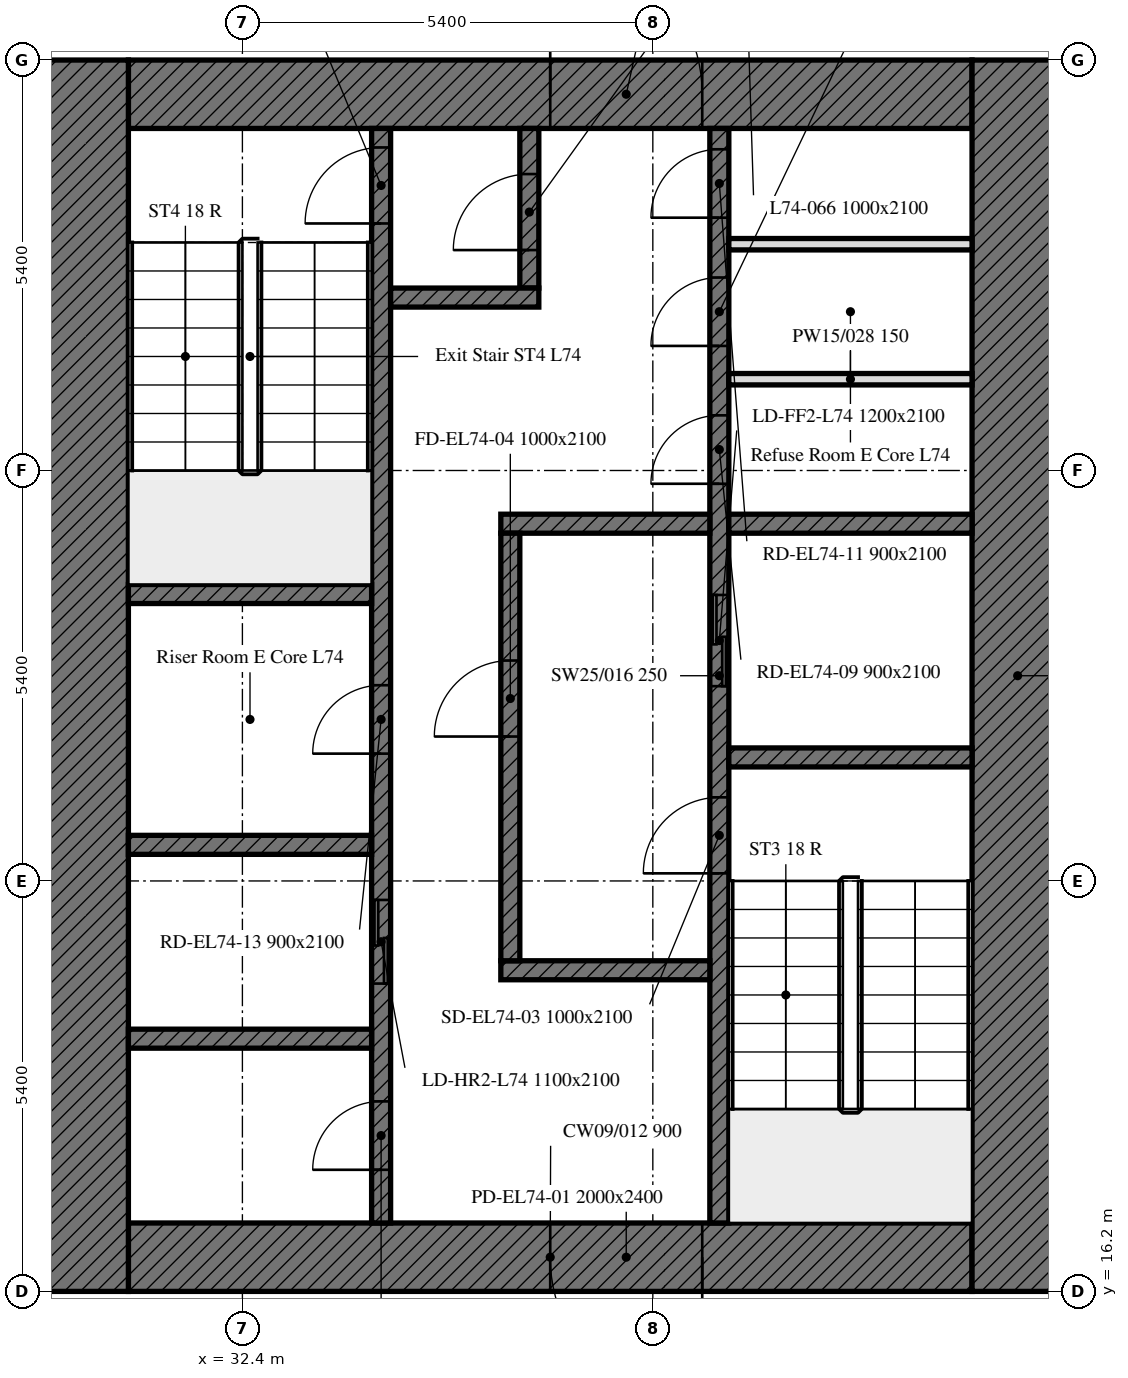
"""IFC4 building model, lengths in metres.
Left out: names, types, materials, properties, quantities, classifications, styles, units other than length and angle.
Written with IfcOpenShell. Run it as: python <this file> out.ifc"""

import sys

from ifc_helpers import new_model, si_unit, direction, frame, frame_2d, origin, place, context, subcontext, project, spatial, rectangle, extrude, element, fill, save


model = new_model("IFC4")
c1 = context("Model", 3, precision=1e-05, world=origin(), true_north=direction((0.0, 1.0)))
c2 = subcontext(c1, "Body", "Model", "MODEL_VIEW")
j1 = project(units=[si_unit("LENGTHUNIT", "METRE"), si_unit("PLANEANGLEUNIT", "RADIAN")], contexts=[c1])
p1 = place(None, origin())
s1 = spatial("IfcSite", under=j1, at=p1, CompositionType="ELEMENT")
p2 = place(p1, origin())
s2 = spatial("IfcBuilding", under=s1, at=p2, CompositionType="ELEMENT")
p3 = place(p2, frame((0.0, 0.0, 298.3)))
s3 = spatial("IfcBuildingStorey", under=s2, at=p3, CompositionType="ELEMENT", Elevation=298.3)
p4 = place(p3, frame((42.0, 16.65, 0.0), z_axis=(0.0, 0.0, 1.0), x_axis=(-1.0, 0.0, 0.0)))
e1 = element("IfcWall", 1, at=p4, inside=s3, PredefinedType="SOLIDWALL", context=c2, shape_type="SweptSolid", body=[
    extrude(rectangle(XDim=11.1, YDim=0.9, at=frame_2d((5.55, 0.0))), origin(), (0.0, 0.0, 1.0), 3.0),
])
p5 = place(p4, frame((3.55, 0.0, 0.0)))
e2 = element("IfcOpeningElement", 2, at=p5, cuts=e1, PredefinedType="OPENING", context=c2, shape_type="SweptSolid", body=[
    extrude(rectangle(XDim=2.0, YDim=2.4, at=frame_2d((1.0, 1.2))), frame((0.0, 0.45, 0.0), z_axis=(0.0, -1.0, 0.0), x_axis=(1.0, 0.0, 0.0)), (0.0, 0.0, 1.0), 0.9),
])
p6 = place(p3, frame((30.9, 31.95, 0.0), z_axis=(0.0, 0.0, 1.0), x_axis=(1.0, 0.0, 0.0)))
e3 = element("IfcWall", 3, at=p6, inside=s3, PredefinedType="SOLIDWALL", context=c2, shape_type="SweptSolid", body=[
    extrude(rectangle(XDim=11.1, YDim=0.9, at=frame_2d((5.55, 0.0))), origin(), (0.0, 0.0, 1.0), 3.0),
])
p7 = place(p6, frame((5.55, 0.0, 0.0)))
e4 = element("IfcOpeningElement", 4, at=p7, cuts=e3, PredefinedType="OPENING", context=c2, shape_type="SweptSolid", body=[
    extrude(rectangle(XDim=2.0, YDim=2.4, at=frame_2d((1.0, 1.2))), frame((0.0, 0.45, 0.0), z_axis=(0.0, -1.0, 0.0), x_axis=(1.0, 0.0, 0.0)), (0.0, 0.0, 1.0), 0.9),
])
for number, where, z_axis, x_axis in (
    (5, (42.6, 32.4, 0.0), (0.0, 0.0, 1.0), (0.0, -1.0, 0.0)),
    (6, (30.3, 16.2, 0.0), (0.0, 0.0, 1.0), (0.0, 1.0, 0.0)),
):
    element("IfcWall", number, at=place(p3, frame(where, z_axis=z_axis, x_axis=x_axis)), inside=s3, PredefinedType="SOLIDWALL", context=c2, shape_type="SweptSolid", body=[
        extrude(rectangle(XDim=16.2, YDim=1.2, at=frame_2d((8.1, 0.0))), origin(), (0.0, 0.0, 1.0), 3.0),
    ])
p8 = place(p3, frame((38.675, 17.1, 0.0), z_axis=(0.0, 0.0, 1.0), x_axis=(0.0, 1.0, 0.0)))
e7 = element("IfcWall", 7, at=p8, inside=s3, PredefinedType="SOLIDWALL", context=c2, shape_type="SweptSolid", body=[
    extrude(rectangle(XDim=14.4, YDim=0.25, at=frame_2d((7.2, 0.0))), origin(), (0.0, 0.0, 1.0), 3.0),
])
p9 = place(p8, frame((4.6, 0.0, 0.0)))
e8 = element("IfcOpeningElement", 8, at=p9, cuts=e7, PredefinedType="OPENING", context=c2, shape_type="SweptSolid", body=[
    extrude(rectangle(XDim=1.0, YDim=2.1, at=frame_2d((0.5, 1.05))), frame((0.0, 0.125, 0.0), z_axis=(0.0, -1.0, 0.0), x_axis=(1.0, 0.0, 0.0)), (0.0, 0.0, 1.0), 0.25),
])
p10 = place(p8, frame((7.062, 0.0, 0.0)))
e9 = element("IfcOpeningElement", 9, at=p10, cuts=e7, PredefinedType="OPENING", context=c2, shape_type="SweptSolid", body=[
    extrude(rectangle(XDim=1.2, YDim=2.1, at=frame_2d((0.6, 1.05))), frame((0.0, 0.125, 0.0), z_axis=(0.0, -1.0, 0.0), x_axis=(1.0, 0.0, 0.0)), (0.0, 0.0, 1.0), 0.25),
])
p11 = place(p8, frame((9.726, 0.0, 0.0)))
e10 = element("IfcOpeningElement", 10, at=p11, cuts=e7, PredefinedType="OPENING", context=c2, shape_type="SweptSolid", body=[
    extrude(rectangle(XDim=0.9, YDim=2.1, at=frame_2d((0.45, 1.05))), frame((0.0, 0.125, 0.0), z_axis=(0.0, -1.0, 0.0), x_axis=(1.0, 0.0, 0.0)), (0.0, 0.0, 1.0), 0.25),
])
p12 = place(p8, frame((11.539, 0.0, 0.0)))
e11 = element("IfcOpeningElement", 11, at=p12, cuts=e7, PredefinedType="OPENING", context=c2, shape_type="SweptSolid", body=[
    extrude(rectangle(XDim=0.9, YDim=2.1, at=frame_2d((0.45, 1.05))), frame((0.0, 0.125, 0.0), z_axis=(0.0, -1.0, 0.0), x_axis=(1.0, 0.0, 0.0)), (0.0, 0.0, 1.0), 0.25),
])
p13 = place(p8, frame((13.226, 0.0, 0.0)))
e12 = element("IfcOpeningElement", 12, at=p13, cuts=e7, PredefinedType="OPENING", context=c2, shape_type="SweptSolid", body=[
    extrude(rectangle(XDim=0.9, YDim=2.1, at=frame_2d((0.45, 1.05))), frame((0.0, 0.125, 0.0), z_axis=(0.0, -1.0, 0.0), x_axis=(1.0, 0.0, 0.0)), (0.0, 0.0, 1.0), 0.25),
])
p14 = place(p3, frame((34.225, 17.1, 0.0), z_axis=(0.0, 0.0, 1.0), x_axis=(0.0, 1.0, 0.0)))
e13 = element("IfcWall", 13, at=p14, inside=s3, PredefinedType="SOLIDWALL", context=c2, shape_type="SweptSolid", body=[
    extrude(rectangle(XDim=14.4, YDim=0.25, at=frame_2d((7.2, 0.0))), origin(), (0.0, 0.0, 1.0), 3.0),
])
p15 = place(p14, frame((13.15, 0.0, 0.0)))
e14 = element("IfcOpeningElement", 14, at=p15, cuts=e13, PredefinedType="OPENING", context=c2, shape_type="SweptSolid", body=[
    extrude(rectangle(XDim=1.0, YDim=2.1, at=frame_2d((0.5, 1.05))), frame((0.0, 0.125, 0.0), z_axis=(0.0, -1.0, 0.0), x_axis=(1.0, 0.0, 0.0)), (0.0, 0.0, 1.0), 0.25),
])
p16 = place(p14, frame((3.15, 0.0, 0.0)))
e15 = element("IfcOpeningElement", 15, at=p16, cuts=e13, PredefinedType="OPENING", context=c2, shape_type="SweptSolid", body=[
    extrude(rectangle(XDim=1.1, YDim=2.1, at=frame_2d((0.55, 1.05))), frame((0.0, 0.125, 0.0), z_axis=(0.0, -1.0, 0.0), x_axis=(1.0, 0.0, 0.0)), (0.0, 0.0, 1.0), 0.25),
])
p17 = place(p14, frame((0.7, 0.0, 0.0)))
e16 = element("IfcOpeningElement", 16, at=p17, cuts=e13, PredefinedType="OPENING", context=c2, shape_type="SweptSolid", body=[
    extrude(rectangle(XDim=0.9, YDim=2.1, at=frame_2d((0.45, 1.05))), frame((0.0, 0.125, 0.0), z_axis=(0.0, -1.0, 0.0), x_axis=(1.0, 0.0, 0.0)), (0.0, 0.0, 1.0), 0.25),
])
p18 = place(p14, frame((6.175, 0.0, 0.0)))
e17 = element("IfcOpeningElement", 17, at=p18, cuts=e13, PredefinedType="OPENING", context=c2, shape_type="SweptSolid", body=[
    extrude(rectangle(XDim=0.9, YDim=2.1, at=frame_2d((0.45, 1.05))), frame((0.0, 0.125, 0.0), z_axis=(0.0, -1.0, 0.0), x_axis=(1.0, 0.0, 0.0)), (0.0, 0.0, 1.0), 0.25),
])
p19 = place(p3, frame((38.8, 23.225, 0.0), z_axis=(0.0, 0.0, 1.0), x_axis=(1.0, 0.0, 0.0)))
e18 = element("IfcWall", 18, at=p19, inside=s3, PredefinedType="SOLIDWALL", context=c2, shape_type="SweptSolid", body=[
    extrude(rectangle(XDim=3.2, YDim=0.25, at=frame_2d((1.6, 0.0))), origin(), (0.0, 0.0, 1.0), 3.0),
])
for number, where, z_axis, x_axis in (
    (19, (30.9, 25.375, 0.0), (0.0, 0.0, 1.0), (1.0, 0.0, 0.0)),
    (20, (30.9, 22.075, 0.0), (0.0, 0.0, 1.0), (1.0, 0.0, 0.0)),
):
    element("IfcWall", number, at=place(p3, frame(where, z_axis=z_axis, x_axis=x_axis)), inside=s3, PredefinedType="SOLIDWALL", context=c2, shape_type="SweptSolid", body=[
        extrude(rectangle(XDim=3.2, YDim=0.25, at=frame_2d((1.6, 0.0))), origin(), (0.0, 0.0, 1.0), 3.0),
    ])
p20 = place(p3, frame((38.8, 26.3, 0.0), z_axis=(0.0, 0.0, 1.0), x_axis=(1.0, 0.0, 0.0)))
e21 = element("IfcWall", 21, at=p20, inside=s3, PredefinedType="SOLIDWALL", context=c2, shape_type="SweptSolid", body=[
    extrude(rectangle(XDim=3.2, YDim=0.25, at=frame_2d((1.6, 0.0))), origin(), (0.0, 0.0, 1.0), 3.0),
])
for number, where, z_axis, x_axis in (
    (22, (35.8, 26.3, 0.0), (0.0, 0.0, 1.0), (1.0, 0.0, 0.0)),
    (23, (35.8, 20.425, 0.0), (0.0, 0.0, 1.0), (1.0, 0.0, 0.0)),
):
    element("IfcWall", number, at=place(p3, frame(where, z_axis=z_axis, x_axis=x_axis)), inside=s3, PredefinedType="SOLIDWALL", context=c2, shape_type="SweptSolid", body=[
        extrude(rectangle(XDim=2.75, YDim=0.25, at=frame_2d((1.375, 0.0))), origin(), (0.0, 0.0, 1.0), 3.0),
    ])
p21 = place(p3, frame((36.175, 29.4, 0.0), z_axis=(0.0, 0.0, 1.0), x_axis=(0.0, 1.0, 0.0)))
e24 = element("IfcWall", 24, at=p21, inside=s3, PredefinedType="SOLIDWALL", context=c2, shape_type="SweptSolid", body=[
    extrude(rectangle(XDim=2.1, YDim=0.25, at=frame_2d((1.05, 0.0))), origin(), (0.0, 0.0, 1.0), 3.0),
])
p22 = place(p21, frame((0.5, 0.0, 0.0)))
e25 = element("IfcOpeningElement", 25, at=p22, cuts=e24, PredefinedType="OPENING", context=c2, shape_type="SweptSolid", body=[
    extrude(rectangle(XDim=1.0, YDim=2.1, at=frame_2d((0.5, 1.05))), frame((0.0, 0.125, 0.0), z_axis=(0.0, -1.0, 0.0), x_axis=(1.0, 0.0, 0.0)), (0.0, 0.0, 1.0), 0.25),
])
p23 = place(p3, frame((34.35, 29.275, 0.0), z_axis=(0.0, 0.0, 1.0), x_axis=(1.0, 0.0, 0.0)))
e26 = element("IfcWall", 26, at=p23, inside=s3, PredefinedType="SOLIDWALL", context=c2, shape_type="SweptSolid", body=[
    extrude(rectangle(XDim=1.95, YDim=0.25, at=frame_2d((0.975, 0.0))), origin(), (0.0, 0.0, 1.0), 3.0),
])
p24 = place(p3, frame((35.925, 20.55, 0.0), z_axis=(0.0, 0.0, 1.0), x_axis=(0.0, 1.0, 0.0)))
e27 = element("IfcWall", 27, at=p24, inside=s3, PredefinedType="SOLIDWALL", context=c2, shape_type="SweptSolid", body=[
    extrude(rectangle(XDim=5.625, YDim=0.25, at=frame_2d((2.812, 0.0))), origin(), (0.0, 0.0, 1.0), 3.0),
])
p25 = place(p24, frame((2.95, 0.0, 0.0)))
e28 = element("IfcOpeningElement", 28, at=p25, cuts=e27, PredefinedType="OPENING", context=c2, shape_type="SweptSolid", body=[
    extrude(rectangle(XDim=1.0, YDim=2.1, at=frame_2d((0.5, 1.05))), frame((0.0, 0.125, 0.0), z_axis=(0.0, -1.0, 0.0), x_axis=(1.0, 0.0, 0.0)), (0.0, 0.0, 1.0), 0.25),
])
p26 = place(p3, frame((30.9, 19.525, 0.0), z_axis=(0.0, 0.0, 1.0), x_axis=(1.0, 0.0, 0.0)))
e29 = element("IfcWall", 29, at=p26, inside=s3, PredefinedType="SOLIDWALL", context=c2, shape_type="SweptSolid", body=[
    extrude(rectangle(XDim=3.2, YDim=0.25, at=frame_2d((1.6, 0.0))), origin(), (0.0, 0.0, 1.0), 3.0),
])
for number, where, z_axis, x_axis in (
    (30, (38.8, 28.201, 0.0), (0.0, 0.0, 1.0), (1.0, 0.0, 0.0)),
    (31, (38.8, 29.977, 0.0), (0.0, 0.0, 1.0), (1.0, 0.0, 0.0)),
):
    element("IfcWall", number, at=place(p3, frame(where, z_axis=z_axis, x_axis=x_axis)), inside=s3, PredefinedType="PARTITIONING", context=c2, shape_type="SweptSolid", body=[
        extrude(rectangle(XDim=3.2, YDim=0.15, at=frame_2d((1.6, 0.0))), origin(), (0.0, 0.0, 1.0), 3.0),
    ])
p27 = place(p5, origin())
e32 = element("IfcDoor", 32, at=p27, inside=s3, OperationType="DOUBLE_DOOR_SINGLE_SWING", PredefinedType="DOOR", context=c2, shape_type="SweptSolid", body=[
    extrude(rectangle(XDim=2.0, YDim=2.4, at=frame_2d((1.0, 1.2))), frame((0.0, 0.025, 0.0), z_axis=(0.0, -1.0, 0.0), x_axis=(1.0, 0.0, 0.0)), (0.0, 0.0, 1.0), 0.05),
])
fill(e2, e32)
p28 = place(p7, origin())
e33 = element("IfcDoor", 33, at=p28, inside=s3, OperationType="DOUBLE_DOOR_SINGLE_SWING", PredefinedType="DOOR", context=c2, shape_type="SweptSolid", body=[
    extrude(rectangle(XDim=2.0, YDim=2.4, at=frame_2d((1.0, 1.2))), frame((0.0, 0.025, 0.0), z_axis=(0.0, -1.0, 0.0), x_axis=(1.0, 0.0, 0.0)), (0.0, 0.0, 1.0), 0.05),
])
fill(e4, e33)
p29 = place(p9, origin())
e34 = element("IfcDoor", 34, at=p29, inside=s3, OperationType="SINGLE_SWING_LEFT", PredefinedType="DOOR", context=c2, shape_type="SweptSolid", body=[
    extrude(rectangle(XDim=1.0, YDim=2.1, at=frame_2d((0.5, 1.05))), frame((0.0, 0.025, 0.0), z_axis=(0.0, -1.0, 0.0), x_axis=(1.0, 0.0, 0.0)), (0.0, 0.0, 1.0), 0.05),
])
fill(e8, e34)
p30 = place(p25, origin())
e35 = element("IfcDoor", 35, at=p30, inside=s3, OperationType="SINGLE_SWING_LEFT", PredefinedType="DOOR", context=c2, shape_type="SweptSolid", body=[
    extrude(rectangle(XDim=1.0, YDim=2.1, at=frame_2d((0.5, 1.05))), frame((0.0, 0.025, 0.0), z_axis=(0.0, -1.0, 0.0), x_axis=(1.0, 0.0, 0.0)), (0.0, 0.0, 1.0), 0.05),
])
fill(e28, e35)
p31 = place(p15, origin())
e36 = element("IfcDoor", 36, at=p31, inside=s3, OperationType="SINGLE_SWING_LEFT", PredefinedType="DOOR", context=c2, shape_type="SweptSolid", body=[
    extrude(rectangle(XDim=1.0, YDim=2.1, at=frame_2d((0.5, 1.05))), frame((0.0, 0.025, 0.0), z_axis=(0.0, -1.0, 0.0), x_axis=(1.0, 0.0, 0.0)), (0.0, 0.0, 1.0), 0.05),
])
fill(e14, e36)
p32 = place(p22, origin())
e37 = element("IfcDoor", 37, at=p32, inside=s3, OperationType="SINGLE_SWING_LEFT", PredefinedType="DOOR", context=c2, shape_type="SweptSolid", body=[
    extrude(rectangle(XDim=1.0, YDim=2.1, at=frame_2d((0.5, 1.05))), frame((0.0, 0.025, 0.0), z_axis=(0.0, -1.0, 0.0), x_axis=(1.0, 0.0, 0.0)), (0.0, 0.0, 1.0), 0.05),
])
fill(e25, e37)
p33 = place(p10, origin())
e38 = element("IfcDoor", 38, at=p33, inside=s3, OperationType="DOUBLE_DOOR_SLIDING", PredefinedType="DOOR", context=c2, shape_type="SweptSolid", body=[
    extrude(rectangle(XDim=1.2, YDim=2.1, at=frame_2d((0.6, 1.05))), frame((0.0, 0.025, 0.0), z_axis=(0.0, -1.0, 0.0), x_axis=(1.0, 0.0, 0.0)), (0.0, 0.0, 1.0), 0.05),
])
fill(e9, e38)
p34 = place(p16, origin())
e39 = element("IfcDoor", 39, at=p34, inside=s3, OperationType="DOUBLE_DOOR_SLIDING", PredefinedType="DOOR", context=c2, shape_type="SweptSolid", body=[
    extrude(rectangle(XDim=1.1, YDim=2.1, at=frame_2d((0.55, 1.05))), frame((0.0, 0.025, 0.0), z_axis=(0.0, -1.0, 0.0), x_axis=(1.0, 0.0, 0.0)), (0.0, 0.0, 1.0), 0.05),
])
fill(e15, e39)
p35 = place(p11, origin())
e40 = element("IfcDoor", 40, at=p35, inside=s3, OperationType="SINGLE_SWING_LEFT", PredefinedType="DOOR", context=c2, shape_type="SweptSolid", body=[
    extrude(rectangle(XDim=0.9, YDim=2.1, at=frame_2d((0.45, 1.05))), frame((0.0, 0.025, 0.0), z_axis=(0.0, -1.0, 0.0), x_axis=(1.0, 0.0, 0.0)), (0.0, 0.0, 1.0), 0.05),
])
fill(e10, e40)
p36 = place(p12, origin())
e41 = element("IfcDoor", 41, at=p36, inside=s3, OperationType="SINGLE_SWING_LEFT", PredefinedType="DOOR", context=c2, shape_type="SweptSolid", body=[
    extrude(rectangle(XDim=0.9, YDim=2.1, at=frame_2d((0.45, 1.05))), frame((0.0, 0.025, 0.0), z_axis=(0.0, -1.0, 0.0), x_axis=(1.0, 0.0, 0.0)), (0.0, 0.0, 1.0), 0.05),
])
fill(e11, e41)
p37 = place(p13, origin())
e42 = element("IfcDoor", 42, at=p37, inside=s3, OperationType="SINGLE_SWING_LEFT", PredefinedType="DOOR", context=c2, shape_type="SweptSolid", body=[
    extrude(rectangle(XDim=0.9, YDim=2.1, at=frame_2d((0.45, 1.05))), frame((0.0, 0.025, 0.0), z_axis=(0.0, -1.0, 0.0), x_axis=(1.0, 0.0, 0.0)), (0.0, 0.0, 1.0), 0.05),
])
fill(e12, e42)
p38 = place(p17, origin())
e43 = element("IfcDoor", 43, at=p38, inside=s3, OperationType="SINGLE_SWING_LEFT", PredefinedType="DOOR", context=c2, shape_type="SweptSolid", body=[
    extrude(rectangle(XDim=0.9, YDim=2.1, at=frame_2d((0.45, 1.05))), frame((0.0, 0.025, 0.0), z_axis=(0.0, -1.0, 0.0), x_axis=(1.0, 0.0, 0.0)), (0.0, 0.0, 1.0), 0.05),
])
fill(e16, e43)
p39 = place(p18, origin())
e44 = element("IfcDoor", 44, at=p39, inside=s3, OperationType="SINGLE_SWING_LEFT", PredefinedType="DOOR", context=c2, shape_type="SweptSolid", body=[
    extrude(rectangle(XDim=0.9, YDim=2.1, at=frame_2d((0.45, 1.05))), frame((0.0, 0.025, 0.0), z_axis=(0.0, -1.0, 0.0), x_axis=(1.0, 0.0, 0.0)), (0.0, 0.0, 1.0), 0.05),
])
fill(e17, e44)
save(model, sys.argv[1])
